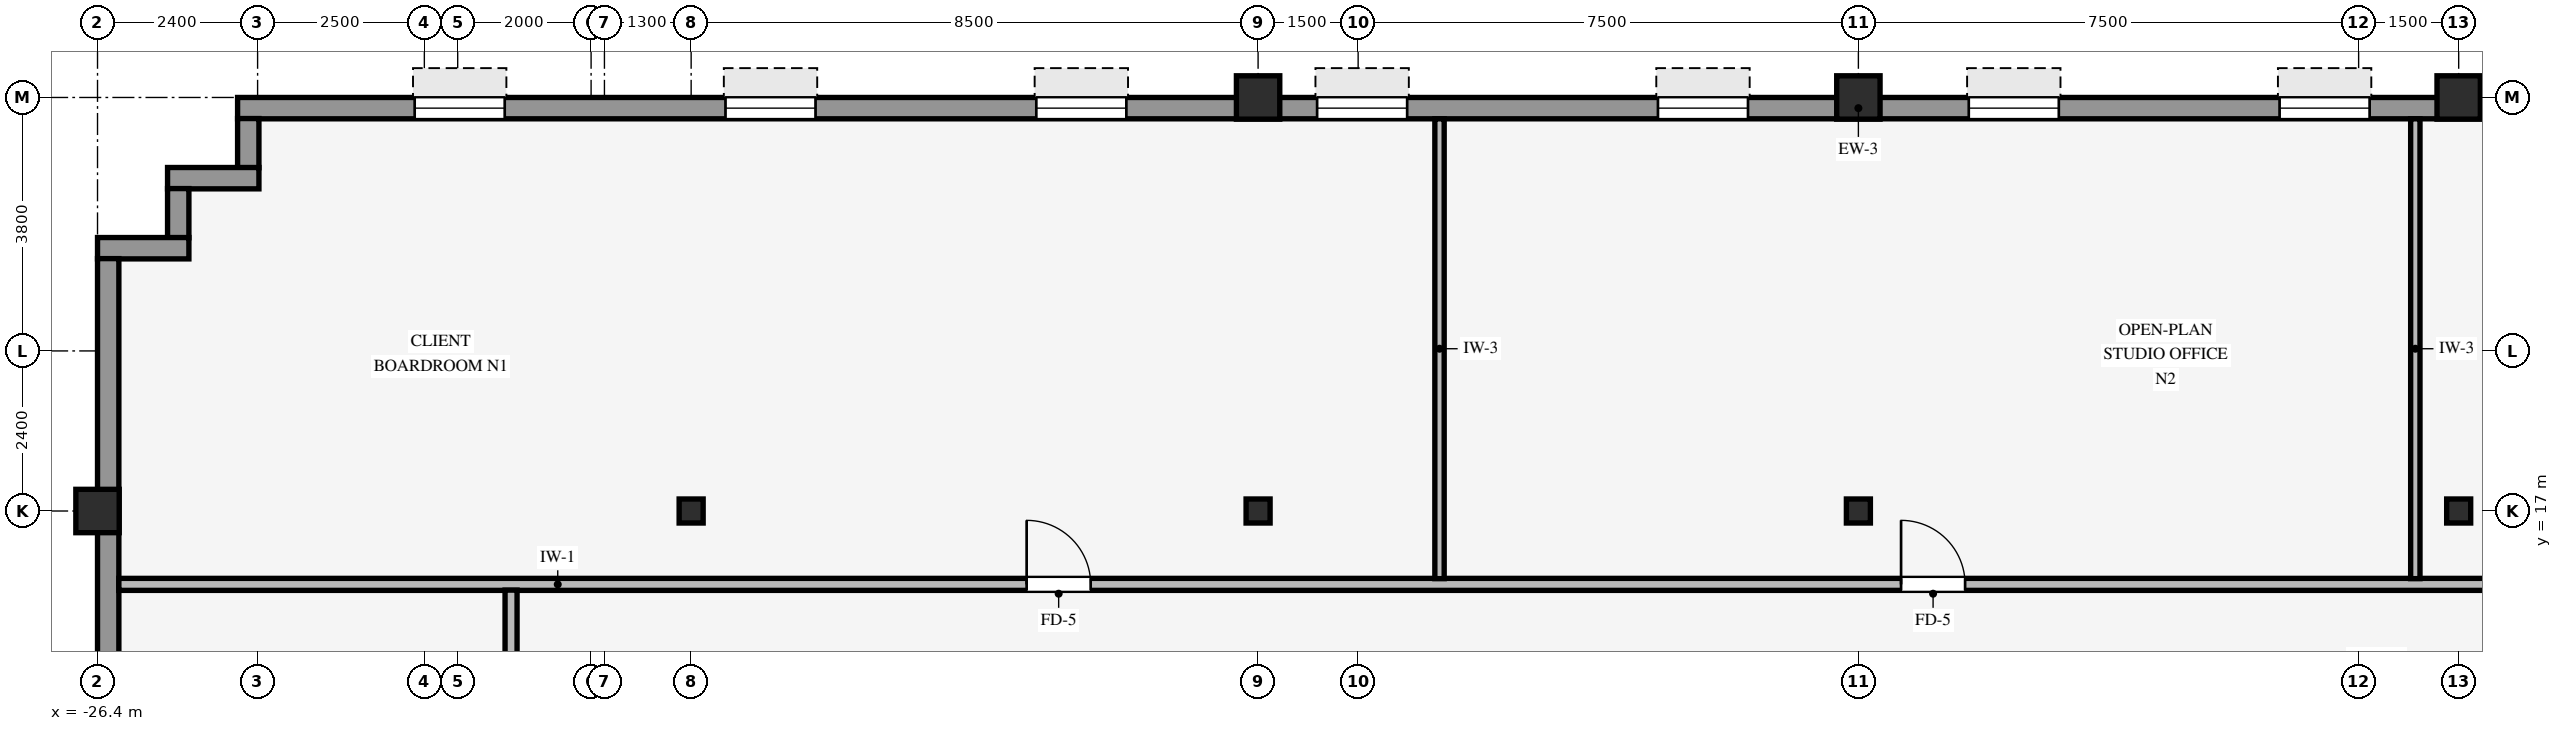
"""IFC4 building model, lengths in metres.
Left out: names, types, materials, properties, quantities, classifications, styles, units other than length and angle.
Written with IfcOpenShell. Run it as: python <this file> out.ifc"""

import sys

from ifc_helpers import new_model, si_unit, direction, frame, frame_2d, origin, origin_2d, place, context, subcontext, project, spatial, rectangle, hollow_rectangle, i_section, extrude, source, transform, mapped, element, fill, save


model = new_model("IFC4")
c1 = context("Model", 3, precision=1e-05, world=origin(), true_north=direction((0.0, 1.0)))
c2 = subcontext(c1, "Body", "Model", "MODEL_VIEW")
j1 = project(units=[si_unit("LENGTHUNIT", "METRE"), si_unit("PLANEANGLEUNIT", "RADIAN")], contexts=[c1])
p1 = place(None, origin())
s1 = spatial("IfcSite", under=j1, at=p1, CompositionType="ELEMENT")
p2 = place(p1, origin())
s2 = spatial("IfcBuilding", under=s1, at=p2, CompositionType="ELEMENT")
p3 = place(p2, frame((0.0, 0.0, 149.4)))
s3 = spatial("IfcBuildingStorey", under=s2, at=p3, CompositionType="ELEMENT", Elevation=149.4)
for number, where, z_axis, x_axis in (
    (1, (-26.4, 17.0, 0.0), (0.0, 0.0, 1.0), (1.0, 0.0, 0.0)),
    (2, (-9.0, 23.2, 0.0), (0.0, 0.0, 1.0), (1.0, 0.0, 0.0)),
    (3, (0.0, 23.2, 0.0), (0.0, 0.0, 1.0), (1.0, 0.0, 0.0)),
    (4, (9.0, 23.2, 0.0), (0.0, 0.0, 1.0), (1.0, 0.0, 0.0)),
):
    element("IfcColumn", number, at=place(p3, frame(where, z_axis=z_axis, x_axis=x_axis)), inside=s3, PredefinedType="COLUMN", context=c2, shape_type="SweptSolid", body=[
        extrude(hollow_rectangle(XDim=0.65, YDim=0.65, WallThickness=0.04, InnerFilletRadius=0.04, OuterFilletRadius=0.08, at=origin_2d()), origin(), (0.0, 0.0, 1.0), 3.37),
    ])
for number, where, z_axis, x_axis in (
    (5, (0.0, 17.0, 0.0), (0.0, 0.0, 1.0), (1.0, 0.0, 0.0)),
    (6, (-17.5, 17.0, 0.0), (0.0, 0.0, 1.0), (1.0, 0.0, 0.0)),
    (7, (-9.0, 17.0, 0.0), (0.0, 0.0, 1.0), (1.0, 0.0, 0.0)),
    (8, (9.0, 17.0, 0.0), (0.0, 0.0, 1.0), (1.0, 0.0, 0.0)),
):
    element("IfcColumn", number, at=place(p3, frame(where, z_axis=z_axis, x_axis=x_axis)), inside=s3, PredefinedType="COLUMN", context=c2, shape_type="SweptSolid", body=[
        extrude(i_section(OverallWidth=0.36, OverallDepth=0.36, WebThickness=0.021, FlangeThickness=0.021, FilletRadius=0.018, at=origin_2d()), origin(), (0.0, 0.0, 1.0), 3.37),
    ])
p4 = place(p3, frame((-24.3, 23.04, 0.0), z_axis=(0.0, 0.0, 1.0), x_axis=(1.0, 0.0, 0.0)))
e9 = element("IfcWall", 9, at=p4, inside=s3, PredefinedType="STANDARD", context=c2, shape_type="SweptSolid", body=[
    extrude(rectangle(XDim=48.6, YDim=0.32, at=frame_2d((24.3, 0.0))), origin(), (0.0, 0.0, 1.0), 2.705),
])
p5 = place(p4, frame((2.655, 0.0, 0.8)))
e10 = element("IfcOpeningElement", 10, at=p5, cuts=e9, PredefinedType="OPENING", context=c2, shape_type="SweptSolid", body=[
    extrude(rectangle(XDim=1.35, YDim=1.56, at=frame_2d((0.675, 0.78))), frame((0.0, 0.17, 0.0), z_axis=(0.0, -1.0, 0.0), x_axis=(1.0, 0.0, 0.0)), (0.0, 0.0, 1.0), 0.34),
])
p6 = place(p4, frame((7.315, 0.0, 0.8)))
e11 = element("IfcOpeningElement", 11, at=p6, cuts=e9, PredefinedType="OPENING", context=c2, shape_type="SweptSolid", body=[
    extrude(rectangle(XDim=1.35, YDim=1.56, at=frame_2d((0.675, 0.78))), frame((0.0, 0.17, 0.0), z_axis=(0.0, -1.0, 0.0), x_axis=(1.0, 0.0, 0.0)), (0.0, 0.0, 1.0), 0.34),
])
p7 = place(p4, frame((11.975, 0.0, 0.8)))
e12 = element("IfcOpeningElement", 12, at=p7, cuts=e9, PredefinedType="OPENING", context=c2, shape_type="SweptSolid", body=[
    extrude(rectangle(XDim=1.35, YDim=1.56, at=frame_2d((0.675, 0.78))), frame((0.0, 0.17, 0.0), z_axis=(0.0, -1.0, 0.0), x_axis=(1.0, 0.0, 0.0)), (0.0, 0.0, 1.0), 0.34),
])
p8 = place(p4, frame((16.185, 0.0, 0.8)))
e13 = element("IfcOpeningElement", 13, at=p8, cuts=e9, PredefinedType="OPENING", context=c2, shape_type="SweptSolid", body=[
    extrude(rectangle(XDim=1.35, YDim=1.56, at=frame_2d((0.675, 0.78))), frame((0.0, 0.17, 0.0), z_axis=(0.0, -1.0, 0.0), x_axis=(1.0, 0.0, 0.0)), (0.0, 0.0, 1.0), 0.34),
])
p9 = place(p4, frame((21.295, 0.0, 0.8)))
e14 = element("IfcOpeningElement", 14, at=p9, cuts=e9, PredefinedType="OPENING", context=c2, shape_type="SweptSolid", body=[
    extrude(rectangle(XDim=1.35, YDim=1.56, at=frame_2d((0.675, 0.78))), frame((0.0, 0.17, 0.0), z_axis=(0.0, -1.0, 0.0), x_axis=(1.0, 0.0, 0.0)), (0.0, 0.0, 1.0), 0.34),
])
p10 = place(p4, frame((25.955, 0.0, 0.8)))
e15 = element("IfcOpeningElement", 15, at=p10, cuts=e9, PredefinedType="OPENING", context=c2, shape_type="SweptSolid", body=[
    extrude(rectangle(XDim=1.35, YDim=1.56, at=frame_2d((0.675, 0.78))), frame((0.0, 0.17, 0.0), z_axis=(0.0, -1.0, 0.0), x_axis=(1.0, 0.0, 0.0)), (0.0, 0.0, 1.0), 0.34),
])
p11 = place(p4, frame((30.615, 0.0, 0.8)))
e16 = element("IfcOpeningElement", 16, at=p11, cuts=e9, PredefinedType="OPENING", context=c2, shape_type="SweptSolid", body=[
    extrude(rectangle(XDim=1.35, YDim=1.56, at=frame_2d((0.675, 0.78))), frame((0.0, 0.17, 0.0), z_axis=(0.0, -1.0, 0.0), x_axis=(1.0, 0.0, 0.0)), (0.0, 0.0, 1.0), 0.34),
])
p12 = place(p4, frame((35.275, 0.0, 0.8)))
e17 = element("IfcOpeningElement", 17, at=p12, cuts=e9, PredefinedType="OPENING", context=c2, shape_type="SweptSolid", body=[
    extrude(rectangle(XDim=1.35, YDim=1.56, at=frame_2d((0.675, 0.78))), frame((0.0, 0.17, 0.0), z_axis=(0.0, -1.0, 0.0), x_axis=(1.0, 0.0, 0.0)), (0.0, 0.0, 1.0), 0.34),
])
p13 = place(p4, frame((39.935, 0.0, 0.8)))
e18 = element("IfcOpeningElement", 18, at=p13, cuts=e9, PredefinedType="OPENING", context=c2, shape_type="SweptSolid", body=[
    extrude(rectangle(XDim=1.35, YDim=1.56, at=frame_2d((0.675, 0.78))), frame((0.0, 0.17, 0.0), z_axis=(0.0, -1.0, 0.0), x_axis=(1.0, 0.0, 0.0)), (0.0, 0.0, 1.0), 0.34),
])
p14 = place(p4, frame((44.595, 0.0, 0.8)))
e19 = element("IfcOpeningElement", 19, at=p14, cuts=e9, PredefinedType="OPENING", context=c2, shape_type="SweptSolid", body=[
    extrude(rectangle(XDim=1.35, YDim=1.56, at=frame_2d((0.675, 0.78))), frame((0.0, 0.17, 0.0), z_axis=(0.0, -1.0, 0.0), x_axis=(1.0, 0.0, 0.0)), (0.0, 0.0, 1.0), 0.34),
])
p15 = place(p3, frame((-24.14, 22.146, 0.0), z_axis=(0.0, 0.0, 1.0), x_axis=(0.0, 1.0, 0.0)))
e20 = element("IfcWall", 20, at=p15, inside=s3, PredefinedType="STANDARD", context=c2, shape_type="SweptSolid", body=[
    extrude(rectangle(XDim=0.738, YDim=0.32, at=frame_2d((0.369, 0.0))), origin(), (0.0, 0.0, 1.0), 3.36),
])
p16 = place(p3, frame((-25.35, 21.99, 0.0), z_axis=(0.0, 0.0, 1.0), x_axis=(1.0, 0.0, 0.0)))
e21 = element("IfcWall", 21, at=p16, inside=s3, PredefinedType="STANDARD", context=c2, shape_type="SweptSolid", body=[
    extrude(rectangle(XDim=1.37, YDim=0.32, at=frame_2d((0.685, 0.0))), origin(), (0.0, 0.0, 1.0), 3.36),
])
p17 = place(p3, frame((-25.19, 21.096, 0.0), z_axis=(0.0, 0.0, 1.0), x_axis=(0.0, 1.0, 0.0)))
e22 = element("IfcWall", 22, at=p17, inside=s3, PredefinedType="STANDARD", context=c2, shape_type="SweptSolid", body=[
    extrude(rectangle(XDim=0.738, YDim=0.32, at=frame_2d((0.369, 0.0))), origin(), (0.0, 0.0, 1.0), 3.36),
])
p18 = place(p3, frame((-26.4, 20.94, 0.0), z_axis=(0.0, 0.0, 1.0), x_axis=(1.0, 0.0, 0.0)))
e23 = element("IfcWall", 23, at=p18, inside=s3, PredefinedType="STANDARD", context=c2, shape_type="SweptSolid", body=[
    extrude(rectangle(XDim=1.37, YDim=0.32, at=frame_2d((0.685, 0.0))), origin(), (0.0, 0.0, 1.0), 3.36),
])
p19 = place(p3, frame((-26.24, -20.784, 0.0), z_axis=(0.0, 0.0, 1.0), x_axis=(0.0, 1.0, 0.0)))
e24 = element("IfcWall", 24, at=p19, inside=s3, PredefinedType="STANDARD", context=c2, shape_type="SweptSolid", body=[
    extrude(rectangle(XDim=41.568, YDim=0.32, at=frame_2d((20.784, 0.0))), origin(), (0.0, 0.0, 1.0), 2.705),
])
p20 = place(p19, frame((7.369, 0.0, 0.8)))
e25 = element("IfcOpeningElement", 25, at=p20, cuts=e24, PredefinedType="OPENING", context=c2, shape_type="SweptSolid", body=[
    extrude(rectangle(XDim=2.1, YDim=1.56, at=frame_2d((1.05, 0.78))), frame((0.0, 0.17, 0.0), z_axis=(0.0, -1.0, 0.0), x_axis=(1.0, 0.0, 0.0)), (0.0, 0.0, 1.0), 0.34),
])
p21 = place(p19, frame((12.315, 0.0, 0.8)))
e26 = element("IfcOpeningElement", 26, at=p21, cuts=e24, PredefinedType="OPENING", context=c2, shape_type="SweptSolid", body=[
    extrude(rectangle(XDim=2.1, YDim=1.56, at=frame_2d((1.05, 0.78))), frame((0.0, 0.17, 0.0), z_axis=(0.0, -1.0, 0.0), x_axis=(1.0, 0.0, 0.0)), (0.0, 0.0, 1.0), 0.34),
])
p22 = place(p19, frame((17.261, 0.0, 0.8)))
e27 = element("IfcOpeningElement", 27, at=p22, cuts=e24, PredefinedType="OPENING", context=c2, shape_type="SweptSolid", body=[
    extrude(rectangle(XDim=2.1, YDim=1.56, at=frame_2d((1.05, 0.78))), frame((0.0, 0.17, 0.0), z_axis=(0.0, -1.0, 0.0), x_axis=(1.0, 0.0, 0.0)), (0.0, 0.0, 1.0), 0.34),
])
p23 = place(p19, frame((22.207, 0.0, 0.8)))
e28 = element("IfcOpeningElement", 28, at=p23, cuts=e24, PredefinedType="OPENING", context=c2, shape_type="SweptSolid", body=[
    extrude(rectangle(XDim=2.1, YDim=1.56, at=frame_2d((1.05, 0.78))), frame((0.0, 0.17, 0.0), z_axis=(0.0, -1.0, 0.0), x_axis=(1.0, 0.0, 0.0)), (0.0, 0.0, 1.0), 0.34),
])
p24 = place(p19, frame((27.153, 0.0, 0.8)))
e29 = element("IfcOpeningElement", 29, at=p24, cuts=e24, PredefinedType="OPENING", context=c2, shape_type="SweptSolid", body=[
    extrude(rectangle(XDim=2.1, YDim=1.56, at=frame_2d((1.05, 0.78))), frame((0.0, 0.17, 0.0), z_axis=(0.0, -1.0, 0.0), x_axis=(1.0, 0.0, 0.0)), (0.0, 0.0, 1.0), 0.34),
])
p25 = place(p19, frame((32.099, 0.0, 0.8)))
e30 = element("IfcOpeningElement", 30, at=p25, cuts=e24, PredefinedType="OPENING", context=c2, shape_type="SweptSolid", body=[
    extrude(rectangle(XDim=2.1, YDim=1.56, at=frame_2d((1.05, 0.78))), frame((0.0, 0.17, 0.0), z_axis=(0.0, -1.0, 0.0), x_axis=(1.0, 0.0, 0.0)), (0.0, 0.0, 1.0), 0.34),
])
p26 = place(p3, frame((-26.08, 15.9, 0.0), z_axis=(0.0, 0.0, 1.0), x_axis=(1.0, 0.0, 0.0)))
e31 = element("IfcWall", 31, at=p26, inside=s3, PredefinedType="PARTITIONING", context=c2, shape_type="SweptSolid", body=[
    extrude(rectangle(XDim=52.16, YDim=0.18, at=frame_2d((26.08, 0.0))), origin(), (0.0, 0.0, 1.0), 3.36),
])
p27 = place(p26, frame((26.72, 0.0, 0.0)))
e32 = element("IfcOpeningElement", 32, at=p27, cuts=e31, PredefinedType="OPENING", context=c2, shape_type="SweptSolid", body=[
    extrude(rectangle(XDim=0.96, YDim=2.1, at=frame_2d((0.48, 1.05))), frame((0.0, 0.1, 0.0), z_axis=(0.0, -1.0, 0.0), x_axis=(1.0, 0.0, 0.0)), (0.0, 0.0, 1.0), 0.2),
])
p28 = place(p26, frame((40.5, 0.0, 0.0)))
e33 = element("IfcOpeningElement", 33, at=p28, cuts=e31, PredefinedType="OPENING", context=c2, shape_type="SweptSolid", body=[
    extrude(rectangle(XDim=0.96, YDim=2.1, at=frame_2d((0.48, 1.05))), frame((0.0, 0.1, 0.0), z_axis=(0.0, -1.0, 0.0), x_axis=(1.0, 0.0, 0.0)), (0.0, 0.0, 1.0), 0.2),
])
p29 = place(p26, frame((13.61, 0.0, 0.0)))
e34 = element("IfcOpeningElement", 34, at=p29, cuts=e31, PredefinedType="OPENING", context=c2, shape_type="SweptSolid", body=[
    extrude(rectangle(XDim=0.96, YDim=2.1, at=frame_2d((0.48, 1.05))), frame((0.0, 0.1, 0.0), z_axis=(0.0, -1.0, 0.0), x_axis=(1.0, 0.0, 0.0)), (0.0, 0.0, 1.0), 0.2),
])
p30 = place(p3, frame((-20.2, -15.814, 0.0), z_axis=(0.0, 0.0, 1.0), x_axis=(0.0, 1.0, 0.0)))
e35 = element("IfcWall", 35, at=p30, inside=s3, PredefinedType="PARTITIONING", context=c2, shape_type="SweptSolid", body=[
    extrude(rectangle(XDim=31.628, YDim=0.18, at=frame_2d((15.814, 0.0))), origin(), (0.0, 0.0, 1.0), 3.36),
])
p31 = place(p30, frame((15.334, 0.0, 0.0)))
e36 = element("IfcOpeningElement", 36, at=p31, cuts=e35, PredefinedType="OPENING", context=c2, shape_type="SweptSolid", body=[
    extrude(rectangle(XDim=0.96, YDim=2.1, at=frame_2d((0.48, 1.05))), frame((0.0, 0.1, 0.0), z_axis=(0.0, -1.0, 0.0), x_axis=(1.0, 0.0, 0.0)), (0.0, 0.0, 1.0), 0.2),
])
p32 = place(p30, frame((5.834, 0.0, 0.0)))
e37 = element("IfcOpeningElement", 37, at=p32, cuts=e35, PredefinedType="OPENING", context=c2, shape_type="SweptSolid", body=[
    extrude(rectangle(XDim=0.96, YDim=2.1, at=frame_2d((0.48, 1.05))), frame((0.0, 0.1, 0.0), z_axis=(0.0, -1.0, 0.0), x_axis=(1.0, 0.0, 0.0)), (0.0, 0.0, 1.0), 0.2),
])
p33 = place(p30, frame((24.834, 0.0, 0.0)))
e38 = element("IfcOpeningElement", 38, at=p33, cuts=e35, PredefinedType="OPENING", context=c2, shape_type="SweptSolid", body=[
    extrude(rectangle(XDim=0.96, YDim=2.1, at=frame_2d((0.48, 1.05))), frame((0.0, 0.1, 0.0), z_axis=(0.0, -1.0, 0.0), x_axis=(1.0, 0.0, 0.0)), (0.0, 0.0, 1.0), 0.2),
])
for number, where, z_axis, x_axis in (
    (39, (-6.28, 15.986, 0.0), (0.0, 0.0, 1.0), (0.0, 1.0, 0.0)),
    (40, (8.35, 15.986, 0.0), (0.0, 0.0, 1.0), (0.0, 1.0, 0.0)),
):
    element("IfcWall", number, at=place(p3, frame(where, z_axis=z_axis, x_axis=x_axis)), inside=s3, PredefinedType="PARTITIONING", context=c2, shape_type="SweptSolid", body=[
        extrude(rectangle(XDim=6.894, YDim=0.14, at=frame_2d((3.447, 0.0))), origin(), (0.0, 0.0, 1.0), 3.36),
    ])
m1 = source(origin(), c2, "Body", "SweptSolid", [
    extrude(rectangle(XDim=1.35, YDim=1.56, at=frame_2d((0.675, 0.78))), frame((0.0, 0.03, 0.0), z_axis=(0.0, -1.0, 0.0), x_axis=(1.0, 0.0, 0.0)), (0.0, 0.0, 1.0), 0.06),
])
p34 = place(p5, origin())
e41 = element("IfcWindow", 41, at=p34, inside=s3, PartitioningType="SINGLE_PANEL", PredefinedType="WINDOW", context=c2, shape_type="MappedRepresentation", body=[
    mapped(m1, transform((0.0, 0.0, 0.0), scale=1.0)),
])
fill(e10, e41)
p35 = place(p6, origin())
e42 = element("IfcWindow", 42, at=p35, inside=s3, PartitioningType="SINGLE_PANEL", PredefinedType="WINDOW", context=c2, shape_type="MappedRepresentation", body=[
    mapped(m1, transform((0.0, 0.0, 0.0), scale=1.0)),
])
fill(e11, e42)
p36 = place(p7, origin())
e43 = element("IfcWindow", 43, at=p36, inside=s3, PartitioningType="SINGLE_PANEL", PredefinedType="WINDOW", context=c2, shape_type="MappedRepresentation", body=[
    mapped(m1, transform((0.0, 0.0, 0.0), scale=1.0)),
])
fill(e12, e43)
p37 = place(p8, origin())
e44 = element("IfcWindow", 44, at=p37, inside=s3, PartitioningType="SINGLE_PANEL", PredefinedType="WINDOW", context=c2, shape_type="MappedRepresentation", body=[
    mapped(m1, transform((0.0, 0.0, 0.0), scale=1.0)),
])
fill(e13, e44)
p38 = place(p9, origin())
e45 = element("IfcWindow", 45, at=p38, inside=s3, PartitioningType="SINGLE_PANEL", PredefinedType="WINDOW", context=c2, shape_type="MappedRepresentation", body=[
    mapped(m1, transform((0.0, 0.0, 0.0), scale=1.0)),
])
fill(e14, e45)
p39 = place(p10, origin())
e46 = element("IfcWindow", 46, at=p39, inside=s3, PartitioningType="SINGLE_PANEL", PredefinedType="WINDOW", context=c2, shape_type="MappedRepresentation", body=[
    mapped(m1, transform((0.0, 0.0, 0.0), scale=1.0)),
])
fill(e15, e46)
p40 = place(p11, origin())
e47 = element("IfcWindow", 47, at=p40, inside=s3, PartitioningType="SINGLE_PANEL", PredefinedType="WINDOW", context=c2, shape_type="MappedRepresentation", body=[
    mapped(m1, transform((0.0, 0.0, 0.0), scale=1.0)),
])
fill(e16, e47)
m2 = source(origin(), c2, "Body", "SweptSolid", [
    extrude(rectangle(XDim=0.96, YDim=2.1, at=frame_2d((0.48, 1.05))), frame((0.0, 0.025, 0.0), z_axis=(0.0, -1.0, 0.0), x_axis=(1.0, 0.0, 0.0)), (0.0, 0.0, 1.0), 0.05),
])
p41 = place(p27, origin())
e48 = element("IfcDoor", 48, at=p41, inside=s3, OperationType="SINGLE_SWING_LEFT", PredefinedType="DOOR", context=c2, shape_type="MappedRepresentation", body=[
    mapped(m2, transform((0.0, 0.0, 0.0), scale=1.0)),
])
fill(e32, e48)
p42 = place(p29, origin())
e49 = element("IfcDoor", 49, at=p42, inside=s3, OperationType="SINGLE_SWING_LEFT", PredefinedType="DOOR", context=c2, shape_type="MappedRepresentation", body=[
    mapped(m2, transform((0.0, 0.0, 0.0), scale=1.0)),
])
fill(e34, e49)
save(model, sys.argv[1])
